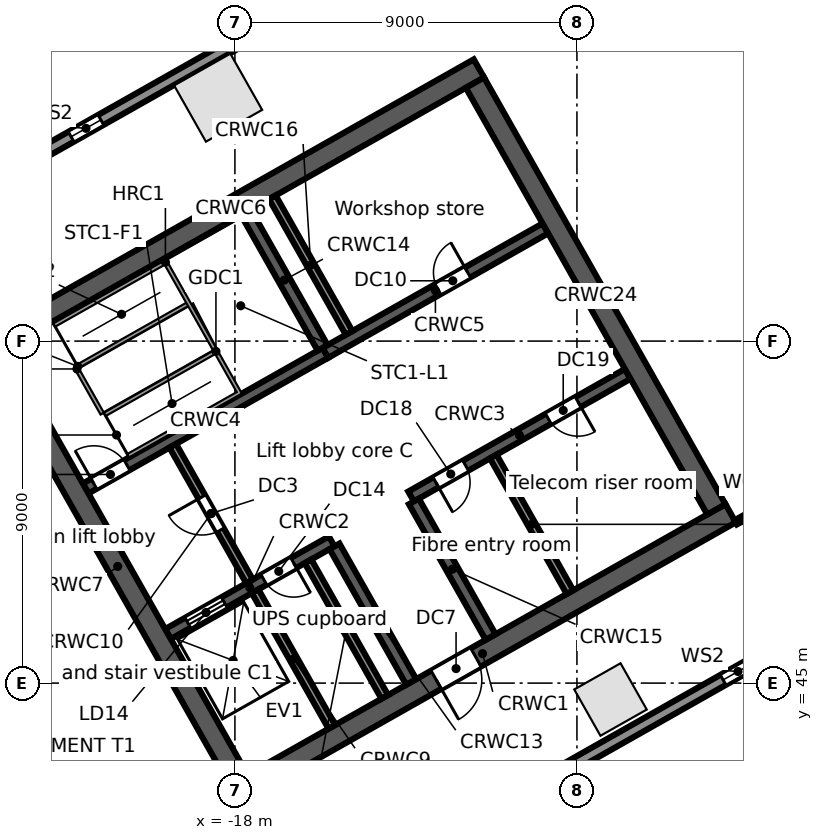
"""IFC4 building model, lengths in metres.
Left out: names, types, materials, properties, quantities, classifications, styles, units other than length and angle.
Written with IfcOpenShell. Run it as: python <this file> out.ifc"""

import sys

from ifc_helpers import new_model, si_unit, direction, frame, frame_2d, origin, origin_2d, place, context, subcontext, project, spatial, rectangle, extrude, element, fill, save


model = new_model("IFC4")
c1 = context("Model", 3, precision=1e-05, world=origin(), true_north=direction((0.0, 1.0)))
c2 = subcontext(c1, "Body", "Model", "MODEL_VIEW")
j1 = project(units=[si_unit("LENGTHUNIT", "METRE"), si_unit("PLANEANGLEUNIT", "RADIAN")], contexts=[c1])
p1 = place(None, origin())
s1 = spatial("IfcSite", under=j1, at=p1, CompositionType="ELEMENT")
p2 = place(p1, origin())
s2 = spatial("IfcBuilding", under=s1, at=p2, CompositionType="ELEMENT")
p3 = place(p2, frame((0.0, 0.0, 110.3)))
s3 = spatial("IfcBuildingStorey", under=s2, at=p3, CompositionType="ELEMENT", Elevation=110.3)
p4 = place(p3, frame((-18.441, 60.406, 0.0), z_axis=(0.0, 0.0, 1.0), x_axis=(-0.87035569594, -0.492423560103, 0.0)))
e1 = element("IfcColumn", 1, at=p4, inside=s3, PredefinedType="COLUMN", context=c2, shape_type="SweptSolid", body=[
    extrude(rectangle(XDim=1.7, YDim=1.7, at=origin_2d()), origin(), (0.0, 0.0, 1.0), 4.4),
])
p5 = place(p3, frame((-8.117, 44.568, 0.0), z_axis=(0.0, 0.0, 1.0), x_axis=(0.87035569594, 0.492423560103, 0.0)))
e2 = element("IfcColumn", 2, at=p5, inside=s3, PredefinedType="COLUMN", context=c2, shape_type="SweptSolid", body=[
    extrude(rectangle(XDim=1.4, YDim=1.4, at=origin_2d()), origin(), (0.0, 0.0, 1.0), 4.4),
])
p6 = place(p3, frame((-58.745, 38.764, 0.0), z_axis=(0.0, 0.0, 1.0), x_axis=(0.870355811726, 0.492423355453, 0.0)))
e3 = element("IfcWall", 3, at=p6, inside=s3, PredefinedType="STANDARD", context=c2, shape_type="SweptSolid", body=[
    extrude(rectangle(XDim=64.025, YDim=0.3, at=frame_2d((32.013, 0.0))), origin(), (0.0, 0.0, 1.0), 4.08),
])
p7 = place(p6, frame((60.122, 0.0, 0.6)))
e4 = element("IfcOpeningElement", 4, at=p7, cuts=e3, PredefinedType="OPENING", context=c2, shape_type="SweptSolid", body=[
    extrude(rectangle(XDim=0.9, YDim=2.8, at=frame_2d((0.45, 1.4))), frame((0.0, 0.16, 0.0), z_axis=(0.0, -1.0, 0.0), x_axis=(1.0, 0.0, 0.0)), (0.0, 0.0, 1.0), 0.32),
])
p8 = place(p6, frame((50.992, 0.0, 0.6)))
e5 = element("IfcOpeningElement", 5, at=p8, cuts=e3, PredefinedType="OPENING", context=c2, shape_type="SweptSolid", body=[
    extrude(rectangle(XDim=0.9, YDim=2.8, at=frame_2d((0.45, 1.4))), frame((0.0, 0.16, 0.0), z_axis=(0.0, -1.0, 0.0), x_axis=(1.0, 0.0, 0.0)), (0.0, 0.0, 1.0), 0.32),
])
p9 = place(p6, frame((41.862, 0.0, 0.6)))
e6 = element("IfcOpeningElement", 6, at=p9, cuts=e3, PredefinedType="OPENING", context=c2, shape_type="SweptSolid", body=[
    extrude(rectangle(XDim=0.9, YDim=2.8, at=frame_2d((0.45, 1.4))), frame((0.0, 0.16, 0.0), z_axis=(0.0, -1.0, 0.0), x_axis=(1.0, 0.0, 0.0)), (0.0, 0.0, 1.0), 0.32),
])
p10 = place(p6, frame((32.732, 0.0, 0.6)))
e7 = element("IfcOpeningElement", 7, at=p10, cuts=e3, PredefinedType="OPENING", context=c2, shape_type="SweptSolid", body=[
    extrude(rectangle(XDim=0.9, YDim=2.8, at=frame_2d((0.45, 1.4))), frame((0.0, 0.16, 0.0), z_axis=(0.0, -1.0, 0.0), x_axis=(1.0, 0.0, 0.0)), (0.0, 0.0, 1.0), 0.32),
])
p11 = place(p6, frame((23.602, 0.0, 0.6)))
e8 = element("IfcOpeningElement", 8, at=p11, cuts=e3, PredefinedType="OPENING", context=c2, shape_type="SweptSolid", body=[
    extrude(rectangle(XDim=0.9, YDim=2.8, at=frame_2d((0.45, 1.4))), frame((0.0, 0.16, 0.0), z_axis=(0.0, -1.0, 0.0), x_axis=(1.0, 0.0, 0.0)), (0.0, 0.0, 1.0), 0.32),
])
p12 = place(p6, frame((14.472, 0.0, 0.6)))
e9 = element("IfcOpeningElement", 9, at=p12, cuts=e3, PredefinedType="OPENING", context=c2, shape_type="SweptSolid", body=[
    extrude(rectangle(XDim=0.9, YDim=2.8, at=frame_2d((0.45, 1.4))), frame((0.0, 0.16, 0.0), z_axis=(0.0, -1.0, 0.0), x_axis=(1.0, 0.0, 0.0)), (0.0, 0.0, 1.0), 0.32),
])
p13 = place(p6, frame((5.342, 0.0, 0.6)))
e10 = element("IfcOpeningElement", 10, at=p13, cuts=e3, PredefinedType="OPENING", context=c2, shape_type="SweptSolid", body=[
    extrude(rectangle(XDim=0.9, YDim=2.8, at=frame_2d((0.45, 1.4))), frame((0.0, 0.16, 0.0), z_axis=(0.0, -1.0, 0.0), x_axis=(1.0, 0.0, 0.0)), (0.0, 0.0, 1.0), 0.32),
])
p14 = place(p3, frame((-0.055, 47.969, 0.0), z_axis=(0.0, 0.0, 1.0), x_axis=(-0.870355730478, -0.492423499058, 0.0)))
e11 = element("IfcWall", 11, at=p14, inside=s3, PredefinedType="STANDARD", context=c2, shape_type="SweptSolid", body=[
    extrude(rectangle(XDim=43.75, YDim=0.3, at=frame_2d((21.875, 0.0))), origin(), (0.0, 0.0, 1.0), 4.08),
])
p15 = place(p14, frame((39.977, 0.0, 0.6)))
e12 = element("IfcOpeningElement", 12, at=p15, cuts=e11, PredefinedType="OPENING", context=c2, shape_type="SweptSolid", body=[
    extrude(rectangle(XDim=0.9, YDim=2.8, at=frame_2d((0.45, 1.4))), frame((0.0, 0.16, 0.0), z_axis=(0.0, -1.0, 0.0), x_axis=(1.0, 0.0, 0.0)), (0.0, 0.0, 1.0), 0.32),
])
p16 = place(p14, frame((31.222, 0.0, 0.6)))
e13 = element("IfcOpeningElement", 13, at=p16, cuts=e11, PredefinedType="OPENING", context=c2, shape_type="SweptSolid", body=[
    extrude(rectangle(XDim=0.9, YDim=2.8, at=frame_2d((0.45, 1.4))), frame((0.0, 0.16, 0.0), z_axis=(0.0, -1.0, 0.0), x_axis=(1.0, 0.0, 0.0)), (0.0, 0.0, 1.0), 0.32),
])
p17 = place(p14, frame((22.468, 0.0, 0.6)))
e14 = element("IfcOpeningElement", 14, at=p17, cuts=e11, PredefinedType="OPENING", context=c2, shape_type="SweptSolid", body=[
    extrude(rectangle(XDim=0.9, YDim=2.8, at=frame_2d((0.45, 1.4))), frame((0.0, 0.16, 0.0), z_axis=(0.0, -1.0, 0.0), x_axis=(1.0, 0.0, 0.0)), (0.0, 0.0, 1.0), 0.32),
])
p18 = place(p14, frame((13.713, 0.0, 0.6)))
e15 = element("IfcOpeningElement", 15, at=p18, cuts=e11, PredefinedType="OPENING", context=c2, shape_type="SweptSolid", body=[
    extrude(rectangle(XDim=0.9, YDim=2.8, at=frame_2d((0.45, 1.4))), frame((0.0, 0.16, 0.0), z_axis=(0.0, -1.0, 0.0), x_axis=(1.0, 0.0, 0.0)), (0.0, 0.0, 1.0), 0.32),
])
p19 = place(p14, frame((4.959, 0.0, 0.6)))
e16 = element("IfcOpeningElement", 16, at=p19, cuts=e11, PredefinedType="OPENING", context=c2, shape_type="SweptSolid", body=[
    extrude(rectangle(XDim=0.9, YDim=2.8, at=frame_2d((0.45, 1.4))), frame((0.0, 0.16, 0.0), z_axis=(0.0, -1.0, 0.0), x_axis=(1.0, 0.0, 0.0)), (0.0, 0.0, 1.0), 0.32),
])
p20 = place(p3, frame((-18.012, 42.083, 0.0), z_axis=(0.0, 0.0, 1.0), x_axis=(0.870360574057, 0.492414937962, 0.0)))
e17 = element("IfcWall", 17, at=p20, inside=s3, PredefinedType="SOLIDWALL", context=c2, shape_type="SweptSolid", body=[
    extrude(rectangle(XDim=15.0, YDim=0.55, at=frame_2d((7.5, 0.0))), origin(), (0.0, 0.0, 1.0), 4.08),
])
p21 = place(p20, frame((6.1, 0.0, 0.0)))
e18 = element("IfcOpeningElement", 18, at=p21, cuts=e17, PredefinedType="OPENING", context=c2, shape_type="SweptSolid", body=[
    extrude(rectangle(XDim=1.2, YDim=2.1, at=frame_2d((0.6, 1.05))), frame((0.0, 0.285, 0.0), z_axis=(0.0, -1.0, 0.0), x_axis=(1.0, 0.0, 0.0)), (0.0, 0.0, 1.0), 0.57),
])
p22 = place(p3, frame((-19.762, 46.292, 0.0), z_axis=(0.0, 0.0, 1.0), x_axis=(0.870359758983, 0.49241637863, 0.0)))
e19 = element("IfcWall", 19, at=p22, inside=s3, PredefinedType="SOLIDWALL", context=c2, shape_type="SweptSolid", body=[
    extrude(rectangle(XDim=4.95, YDim=0.3, at=frame_2d((2.475, 0.0))), origin(), (0.0, 0.0, 1.0), 4.08),
])
p23 = place(p22, frame((0.6, 0.0, 0.0)))
e20 = element("IfcOpeningElement", 20, at=p23, cuts=e19, PredefinedType="OPENING", context=c2, shape_type="SweptSolid", body=[
    extrude(rectangle(XDim=1.1, YDim=2.1, at=frame_2d((0.55, 1.05))), frame((0.0, 0.16, 0.0), z_axis=(0.0, -1.0, 0.0), x_axis=(1.0, 0.0, 0.0)), (0.0, 0.0, 1.0), 0.32),
])
p24 = place(p22, frame((2.9, 0.0, 0.0)))
e21 = element("IfcOpeningElement", 21, at=p24, cuts=e19, PredefinedType="OPENING", context=c2, shape_type="SweptSolid", body=[
    extrude(rectangle(XDim=0.9, YDim=2.1, at=frame_2d((0.45, 1.05))), frame((0.0, 0.16, 0.0), z_axis=(0.0, -1.0, 0.0), x_axis=(1.0, 0.0, 0.0)), (0.0, 0.0, 1.0), 0.32),
])
p25 = place(p3, frame((-13.365, 49.911, 0.0), z_axis=(0.0, 0.0, 1.0), x_axis=(0.870336435567, 0.492457601144, 0.0)))
e22 = element("IfcWall", 22, at=p25, inside=s3, PredefinedType="SOLIDWALL", context=c2, shape_type="SweptSolid", body=[
    extrude(rectangle(XDim=6.55, YDim=0.3, at=frame_2d((3.275, 0.0))), origin(), (0.0, 0.0, 1.0), 4.08),
])
p26 = place(p25, frame((0.75, 0.0, 0.0)))
e23 = element("IfcOpeningElement", 23, at=p26, cuts=e22, PredefinedType="OPENING", context=c2, shape_type="SweptSolid", body=[
    extrude(rectangle(XDim=0.9, YDim=2.1, at=frame_2d((0.45, 1.05))), frame((0.0, 0.16, 0.0), z_axis=(0.0, -1.0, 0.0), x_axis=(1.0, 0.0, 0.0)), (0.0, 0.0, 1.0), 0.32),
])
p27 = place(p25, frame((4.15, 0.0, 0.0)))
e24 = element("IfcOpeningElement", 24, at=p27, cuts=e22, PredefinedType="OPENING", context=c2, shape_type="SweptSolid", body=[
    extrude(rectangle(XDim=0.9, YDim=2.1, at=frame_2d((0.45, 1.05))), frame((0.0, 0.16, 0.0), z_axis=(0.0, -1.0, 0.0), x_axis=(1.0, 0.0, 0.0)), (0.0, 0.0, 1.0), 0.32),
])
p28 = place(p3, frame((-21.928, 50.121, 0.0), z_axis=(0.0, 0.0, 1.0), x_axis=(0.870340732628, 0.49245000673, 0.0)))
e25 = element("IfcWall", 25, at=p28, inside=s3, PredefinedType="SOLIDWALL", context=c2, shape_type="SweptSolid", body=[
    extrude(rectangle(XDim=7.25, YDim=0.3, at=frame_2d((3.625, 0.0))), origin(), (0.0, 0.0, 1.0), 4.08),
])
p29 = place(p28, frame((0.25, 0.0, 0.0)))
e26 = element("IfcOpeningElement", 26, at=p29, cuts=e25, PredefinedType="OPENING", context=c2, shape_type="SweptSolid", body=[
    extrude(rectangle(XDim=1.0, YDim=2.1, at=frame_2d((0.5, 1.05))), frame((0.0, 0.16, 0.0), z_axis=(0.0, -1.0, 0.0), x_axis=(1.0, 0.0, 0.0)), (0.0, 0.0, 1.0), 0.32),
])
p30 = place(p3, frame((-15.618, 53.691, 0.0), z_axis=(0.0, 0.0, 1.0), x_axis=(0.870367894134, 0.492401999246, 0.0)))
e27 = element("IfcWall", 27, at=p30, inside=s3, PredefinedType="SOLIDWALL", context=c2, shape_type="SweptSolid", body=[
    extrude(rectangle(XDim=6.65, YDim=0.3, at=frame_2d((3.325, 0.0))), origin(), (0.0, 0.0, 1.0), 4.08),
])
p31 = place(p30, frame((3.4, 0.0, 0.0)))
e28 = element("IfcOpeningElement", 28, at=p31, cuts=e27, PredefinedType="OPENING", context=c2, shape_type="SweptSolid", body=[
    extrude(rectangle(XDim=0.9, YDim=2.1, at=frame_2d((0.45, 1.05))), frame((0.0, 0.16, 0.0), z_axis=(0.0, -1.0, 0.0), x_axis=(1.0, 0.0, 0.0)), (0.0, 0.0, 1.0), 0.32),
])
p32 = place(p3, frame((-24.635, 53.789, 0.0), z_axis=(0.0, 0.0, 1.0), x_axis=(0.870360574057, 0.492414937962, 0.0)))
e29 = element("IfcWall", 29, at=p32, inside=s3, PredefinedType="SOLIDWALL", context=c2, shape_type="SweptSolid", body=[
    extrude(rectangle(XDim=15.0, YDim=0.55, at=frame_2d((7.5, 0.0))), origin(), (0.0, 0.0, 1.0), 4.08),
])
p33 = place(p3, frame((-24.26, 53.685, 0.0), z_axis=(0.0, 0.0, 1.0), x_axis=(0.492427022044, -0.870353737259, 0.0)))
e30 = element("IfcWall", 30, at=p33, inside=s3, PredefinedType="SOLIDWALL", context=c2, shape_type="SweptSolid", body=[
    extrude(rectangle(XDim=12.9, YDim=0.55, at=frame_2d((6.45, 0.0))), origin(), (0.0, 0.0, 1.0), 4.08),
])
p34 = place(p3, frame((-17.469, 47.417, 0.0), z_axis=(0.0, 0.0, 1.0), x_axis=(0.492453559952, -0.87033872216, 0.0)))
e31 = element("IfcWall", 31, at=p34, inside=s3, PredefinedType="SOLIDWALL", context=c2, shape_type="SweptSolid", body=[
    extrude(rectangle(XDim=4.1, YDim=0.2, at=frame_2d((2.05, 0.0))), origin(), (0.0, 0.0, 1.0), 4.08),
])
p35 = place(p3, frame((-19.635, 51.246, 0.0), z_axis=(0.0, 0.0, 1.0), x_axis=(0.492408451753, -0.87036424366, 0.0)))
e32 = element("IfcWall", 32, at=p35, inside=s3, PredefinedType="PARTITIONING", context=c2, shape_type="SweptSolid", body=[
    extrude(rectangle(XDim=4.1, YDim=0.2, at=frame_2d((2.05, 0.0))), origin(), (0.0, 0.0, 1.0), 4.08),
])
p36 = place(p35, frame((1.55, 0.0, 0.0)))
e33 = element("IfcOpeningElement", 33, at=p36, cuts=e32, PredefinedType="OPENING", context=c2, shape_type="SweptSolid", body=[
    extrude(rectangle(XDim=1.0, YDim=2.1, at=frame_2d((0.5, 1.05))), frame((0.0, 0.11, 0.0), z_axis=(0.0, -1.0, 0.0), x_axis=(1.0, 0.0, 0.0)), (0.0, 0.0, 1.0), 0.22),
])
p37 = place(p3, frame((-16.076, 48.205, 0.0), z_axis=(0.0, 0.0, 1.0), x_axis=(0.492408451753, -0.87036424366, 0.0)))
e34 = element("IfcWall", 34, at=p37, inside=s3, PredefinedType="SOLIDWALL", context=c2, shape_type="SweptSolid", body=[
    extrude(rectangle(XDim=4.1, YDim=0.2, at=frame_2d((2.05, 0.0))), origin(), (0.0, 0.0, 1.0), 4.08),
])
for number, where, z_axis, x_axis in (
    (35, (-15.379, 48.599, 0.0), (0.0, 0.0, 1.0), (0.492, -0.87, 0.0)),
    (36, (-17.711, 57.39, 0.0), (0.0, 0.0, 1.0), (0.492, -0.87, 0.0)),
):
    element("IfcWall", number, at=place(p3, frame(where, z_axis=z_axis, x_axis=x_axis)), inside=s3, PredefinedType="SOLIDWALL", context=c2, shape_type="SweptSolid", body=[
        extrude(rectangle(XDim=4.1, YDim=0.3, at=frame_2d((2.05, 0.0))), origin(), (0.0, 0.0, 1.0), 4.08),
    ])
p38 = place(p3, frame((-13.291, 49.781, 0.0), z_axis=(0.0, 0.0, 1.0), x_axis=(0.492382931784, -0.870378681085, 0.0)))
e37 = element("IfcWall", 37, at=p38, inside=s3, PredefinedType="SOLIDWALL", context=c2, shape_type="SweptSolid", body=[
    extrude(rectangle(XDim=4.1, YDim=0.3, at=frame_2d((2.05, 0.0))), origin(), (0.0, 0.0, 1.0), 4.08),
])
p39 = place(p3, frame((-17.015, 57.784, 0.0), z_axis=(0.0, 0.0, 1.0), x_axis=(0.492408451753, -0.87036424366, 0.0)))
e38 = element("IfcWall", 38, at=p39, inside=s3, PredefinedType="SOLIDWALL", context=c2, shape_type="SweptSolid", body=[
    extrude(rectangle(XDim=4.1, YDim=0.2, at=frame_2d((2.05, 0.0))), origin(), (0.0, 0.0, 1.0), 4.08),
])
p40 = place(p3, frame((-11.202, 50.962, 0.0), z_axis=(0.0, 0.0, 1.0), x_axis=(0.492428039142, -0.870353161807, 0.0)))
e39 = element("IfcWall", 39, at=p40, inside=s3, PredefinedType="PARTITIONING", context=c2, shape_type="SweptSolid", body=[
    extrude(rectangle(XDim=4.1, YDim=0.2, at=frame_2d((2.05, 0.0))), origin(), (0.0, 0.0, 1.0), 4.08),
])
p41 = place(p3, frame((-11.684, 60.8, 0.0), z_axis=(0.0, 0.0, 1.0), x_axis=(0.492427022044, -0.870353737259, 0.0)))
e40 = element("IfcWall", 40, at=p41, inside=s3, PredefinedType="SOLIDWALL", context=c2, shape_type="SweptSolid", body=[
    extrude(rectangle(XDim=12.9, YDim=0.55, at=frame_2d((6.45, 0.0))), origin(), (0.0, 0.0, 1.0), 4.08),
])
p42 = place(p3, frame((-4.821, 49.23, 0.0), z_axis=(0.0, 0.0, 1.0), x_axis=(0.870371217631, 0.492396124598, 0.0)))
e41 = element("IfcWall", 41, at=p42, inside=s3, PredefinedType="PARTITIONING", context=c2, shape_type="SweptSolid", body=[
    extrude(rectangle(XDim=2.659, YDim=0.125, at=frame_2d((1.329, 0.0))), origin(), (0.0, 0.0, 1.0), 4.08),
])
p43 = place(p9, origin())
e42 = element("IfcWindow", 42, at=p43, inside=s3, PartitioningType="SINGLE_PANEL", PredefinedType="WINDOW", context=c2, shape_type="SweptSolid", body=[
    extrude(rectangle(XDim=0.9, YDim=2.8, at=frame_2d((0.45, 1.4))), frame((0.0, 0.03, 0.0), z_axis=(0.0, -1.0, 0.0), x_axis=(1.0, 0.0, 0.0)), (0.0, 0.0, 1.0), 0.06),
])
fill(e6, e42)
p44 = place(p19, origin())
e43 = element("IfcWindow", 43, at=p44, inside=s3, PartitioningType="SINGLE_PANEL", PredefinedType="WINDOW", context=c2, shape_type="SweptSolid", body=[
    extrude(rectangle(XDim=0.9, YDim=2.8, at=frame_2d((0.45, 1.4))), frame((0.0, 0.03, 0.0), z_axis=(0.0, -1.0, 0.0), x_axis=(1.0, 0.0, 0.0)), (0.0, 0.0, 1.0), 0.06),
])
fill(e16, e43)
p45 = place(p23, origin())
e44 = element("IfcDoor", 44, at=p45, inside=s3, OperationType="DOUBLE_DOOR_SLIDING", PredefinedType="DOOR", context=c2, shape_type="SweptSolid", body=[
    extrude(rectangle(XDim=1.1, YDim=2.1, at=frame_2d((0.55, 1.05))), frame((0.0, 0.025, 0.0), z_axis=(0.0, -1.0, 0.0), x_axis=(1.0, 0.0, 0.0)), (0.0, 0.0, 1.0), 0.05),
])
fill(e20, e44)
p46 = place(p29, origin())
e45 = element("IfcDoor", 45, at=p46, inside=s3, OperationType="SINGLE_SWING_LEFT", PredefinedType="DOOR", context=c2, shape_type="SweptSolid", body=[
    extrude(rectangle(XDim=1.0, YDim=2.1, at=frame_2d((0.5, 1.05))), frame((0.0, 0.025, 0.0), z_axis=(0.0, -1.0, 0.0), x_axis=(1.0, 0.0, 0.0)), (0.0, 0.0, 1.0), 0.05),
])
fill(e26, e45)
p47 = place(p36, frame((1.0, 0.0, 0.0), z_axis=(0.0, 0.0, 1.0), x_axis=(-1.0, 0.0, 0.0)))
e46 = element("IfcDoor", 46, at=p47, inside=s3, OperationType="SINGLE_SWING_RIGHT", PredefinedType="DOOR", context=c2, shape_type="SweptSolid", body=[
    extrude(rectangle(XDim=1.0, YDim=2.1, at=frame_2d((0.5, 1.05))), frame((0.0, 0.025, 0.0), z_axis=(0.0, -1.0, 0.0), x_axis=(1.0, 0.0, 0.0)), (0.0, 0.0, 1.0), 0.05),
])
fill(e33, e46)
p48 = place(p21, frame((1.2, 0.0, 0.0), z_axis=(0.0, 0.0, 1.0), x_axis=(-1.0, 0.0, 0.0)))
e47 = element("IfcDoor", 47, at=p48, inside=s3, OperationType="SINGLE_SWING_RIGHT", PredefinedType="DOOR", context=c2, shape_type="SweptSolid", body=[
    extrude(rectangle(XDim=1.2, YDim=2.1, at=frame_2d((0.6, 1.05))), frame((0.0, 0.025, 0.0), z_axis=(0.0, -1.0, 0.0), x_axis=(1.0, 0.0, 0.0)), (0.0, 0.0, 1.0), 0.05),
])
fill(e18, e47)
p49 = place(p31, origin())
e48 = element("IfcDoor", 48, at=p49, inside=s3, OperationType="SINGLE_SWING_RIGHT", PredefinedType="DOOR", context=c2, shape_type="SweptSolid", body=[
    extrude(rectangle(XDim=0.9, YDim=2.1, at=frame_2d((0.45, 1.05))), frame((0.0, 0.025, 0.0), z_axis=(0.0, -1.0, 0.0), x_axis=(1.0, 0.0, 0.0)), (0.0, 0.0, 1.0), 0.05),
])
fill(e28, e48)
p50 = place(p24, frame((0.9, 0.0, 0.0), z_axis=(0.0, 0.0, 1.0), x_axis=(-1.0, 0.0, 0.0)))
e49 = element("IfcDoor", 49, at=p50, inside=s3, OperationType="SINGLE_SWING_LEFT", PredefinedType="DOOR", context=c2, shape_type="SweptSolid", body=[
    extrude(rectangle(XDim=0.9, YDim=2.1, at=frame_2d((0.45, 1.05))), frame((0.0, 0.025, 0.0), z_axis=(0.0, -1.0, 0.0), x_axis=(1.0, 0.0, 0.0)), (0.0, 0.0, 1.0), 0.05),
])
fill(e21, e49)
p51 = place(p26, frame((0.9, 0.0, 0.0), z_axis=(0.0, 0.0, 1.0), x_axis=(-1.0, 0.0, 0.0)))
e50 = element("IfcDoor", 50, at=p51, inside=s3, OperationType="SINGLE_SWING_RIGHT", PredefinedType="DOOR", context=c2, shape_type="SweptSolid", body=[
    extrude(rectangle(XDim=0.9, YDim=2.1, at=frame_2d((0.45, 1.05))), frame((0.0, 0.025, 0.0), z_axis=(0.0, -1.0, 0.0), x_axis=(1.0, 0.0, 0.0)), (0.0, 0.0, 1.0), 0.05),
])
fill(e23, e50)
p52 = place(p27, frame((0.9, 0.0, 0.0), z_axis=(0.0, 0.0, 1.0), x_axis=(-1.0, 0.0, 0.0)))
e51 = element("IfcDoor", 51, at=p52, inside=s3, OperationType="SINGLE_SWING_LEFT", PredefinedType="DOOR", context=c2, shape_type="SweptSolid", body=[
    extrude(rectangle(XDim=0.9, YDim=2.1, at=frame_2d((0.45, 1.05))), frame((0.0, 0.025, 0.0), z_axis=(0.0, -1.0, 0.0), x_axis=(1.0, 0.0, 0.0)), (0.0, 0.0, 1.0), 0.05),
])
fill(e24, e51)
save(model, sys.argv[1])
